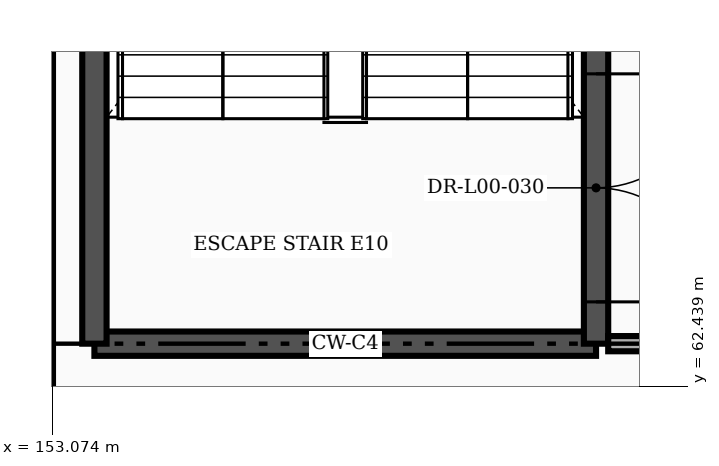
"""IFC4 building model, lengths in metres.
Left out: names, types, materials, properties, quantities, classifications, styles, units other than length and angle.
Written with IfcOpenShell. Run it as: python <this file> out.ifc"""

import sys

from ifc_helpers import new_model, si_unit, direction, frame, frame_2d, origin, place, context, subcontext, project, spatial, rectangle, extrude, element, fill, save


model = new_model("IFC4")
c1 = context("Model", 3, precision=1e-05, world=origin(), true_north=direction((0.0, 1.0)))
c2 = subcontext(c1, "Body", "Model", "MODEL_VIEW")
j1 = project(units=[si_unit("LENGTHUNIT", "METRE"), si_unit("PLANEANGLEUNIT", "RADIAN")], contexts=[c1])
p1 = place(None, origin())
s1 = spatial("IfcSite", under=j1, at=p1, CompositionType="ELEMENT")
p2 = place(p1, origin())
s2 = spatial("IfcBuilding", under=s1, at=p2, CompositionType="ELEMENT")
p3 = place(p2, origin())
s3 = spatial("IfcBuildingStorey", under=s2, at=p3, CompositionType="ELEMENT", Elevation=0.0)
p4 = place(p3, frame((153.63, 63.0, 0.0), z_axis=(0.0, 0.0, 1.0), x_axis=(1.0, 0.0, 0.0)))
e1 = element("IfcWall", 1, at=p4, inside=s3, PredefinedType="SHEAR", context=c2, shape_type="SweptSolid", body=[
    extrude(rectangle(XDim=6.6, YDim=0.32, at=frame_2d((3.3, 0.0))), origin(), (0.0, 0.0, 1.0), 5.75),
])
p5 = place(p3, frame((153.63, 63.0, 0.0), z_axis=(0.0, 0.0, 1.0), x_axis=(0.0, 1.0, 0.0)))
e2 = element("IfcWall", 2, at=p5, inside=s3, PredefinedType="SHEAR", context=c2, shape_type="SweptSolid", body=[
    extrude(rectangle(XDim=11.2, YDim=0.32, at=frame_2d((5.6, 0.0))), origin(), (0.0, 0.0, 1.0), 5.75),
])
p6 = place(p3, frame((160.23, 63.0, 0.0), z_axis=(0.0, 0.0, 1.0), x_axis=(0.0, 1.0, 0.0)))
e3 = element("IfcWall", 3, at=p6, inside=s3, PredefinedType="SHEAR", context=c2, shape_type="SweptSolid", body=[
    extrude(rectangle(XDim=11.2, YDim=0.32, at=frame_2d((5.6, 0.0))), origin(), (0.0, 0.0, 1.0), 5.75),
])
p7 = place(p6, frame((0.55, 0.0, 0.0)))
e4 = element("IfcOpeningElement", 4, at=p7, cuts=e3, PredefinedType="OPENING", context=c2, shape_type="SweptSolid", body=[
    extrude(rectangle(XDim=3.0, YDim=2.25, at=frame_2d((1.5, 1.125))), frame((0.0, 0.172, 0.0), z_axis=(0.0, -1.0, 0.0), x_axis=(1.0, 0.0, 0.0)), (0.0, 0.0, 1.0), 0.344),
])
p8 = place(p3, frame((160.39, 63.0, 0.0), z_axis=(0.0, 0.0, 1.0), x_axis=(1.0, 0.0, 0.0)))
e5 = element("IfcWall", 5, at=p8, inside=s3, PredefinedType="PARTITIONING", context=c2, shape_type="SweptSolid", body=[
    extrude(rectangle(XDim=11.05, YDim=0.2, at=frame_2d((5.525, 0.0))), origin(), (0.0, 0.0, 1.0), 5.75),
])
p9 = place(p8, frame((7.16, 0.0, 0.0)))
e6 = element("IfcOpeningElement", 6, at=p9, cuts=e5, PredefinedType="OPENING", context=c2, shape_type="SweptSolid", body=[
    extrude(rectangle(XDim=1.15, YDim=2.15, at=frame_2d((0.575, 1.075))), frame((0.0, 0.112, 0.0), z_axis=(0.0, -1.0, 0.0), x_axis=(1.0, 0.0, 0.0)), (0.0, 0.0, 1.0), 0.224),
])
p10 = place(p3, frame((153.0, 60.22, 0.0), z_axis=(0.0, 0.0, 1.0), x_axis=(0.0, 1.0, 0.0)))
e7 = element("IfcWall", 7, at=p10, inside=s3, PredefinedType="PARTITIONING", context=c2, shape_type="SweptSolid", body=[
    extrude(rectangle(XDim=23.56, YDim=0.17, at=frame_2d((11.78, 0.0))), origin(), (0.0, 0.0, 1.0), 5.066),
])
p11 = place(p10, frame((0.28, 0.0, 0.0)))
e8 = element("IfcOpeningElement", 8, at=p11, cuts=e7, PredefinedType="OPENING", context=c2, shape_type="SweptSolid", body=[
    extrude(rectangle(XDim=2.4, YDim=2.35, at=frame_2d((1.2, 1.175))), frame((0.0, 0.097, 0.0), z_axis=(0.0, -1.0, 0.0), x_axis=(1.0, 0.0, 0.0)), (0.0, 0.0, 1.0), 0.194),
])
p12 = place(p7, frame((3.0, 0.0, 0.0), z_axis=(0.0, 0.0, 1.0), x_axis=(-1.0, 0.0, 0.0)))
e9 = element("IfcDoor", 9, at=p12, inside=s3, OperationType="DOUBLE_DOOR_SINGLE_SWING", PredefinedType="DOOR", context=c2, shape_type="SweptSolid", body=[
    extrude(rectangle(XDim=3.0, YDim=2.25, at=frame_2d((1.5, 1.125))), frame((0.0, 0.025, 0.0), z_axis=(0.0, -1.0, 0.0), x_axis=(1.0, 0.0, 0.0)), (0.0, 0.0, 1.0), 0.05),
])
fill(e4, e9)
save(model, sys.argv[1])
